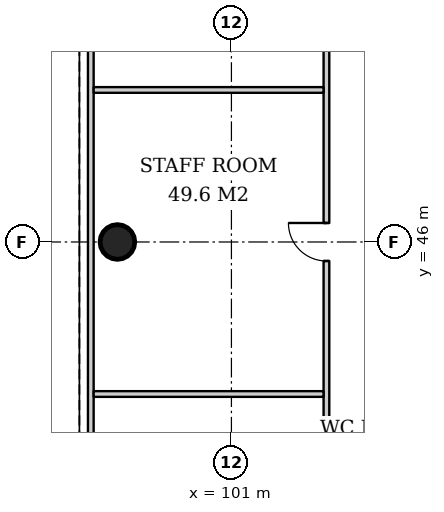
"""IFC4 building model, lengths in metres.
Left out: names, types, materials, properties, quantities, classifications, styles, units other than length and angle.
Written with IfcOpenShell. Run it as: python <this file> out.ifc"""

import sys

from ifc_helpers import new_model, si_unit, direction, frame, frame_2d, origin, origin_2d, place, context, subcontext, project, spatial, rectangle, hollow_circle, extrude, element, fill, save


model = new_model("IFC4")
c1 = context("Model", 3, precision=1e-05, world=origin(), true_north=direction((0.0, 1.0)))
c2 = subcontext(c1, "Body", "Model", "MODEL_VIEW")
j1 = project(units=[si_unit("LENGTHUNIT", "METRE"), si_unit("PLANEANGLEUNIT", "RADIAN")], contexts=[c1])
p1 = place(None, origin())
s1 = spatial("IfcSite", under=j1, at=p1, CompositionType="ELEMENT")
p2 = place(p1, origin())
s2 = spatial("IfcBuilding", under=s1, at=p2, CompositionType="ELEMENT")
p3 = place(p2, origin())
s3 = spatial("IfcBuildingStorey", under=s2, at=p3, CompositionType="ELEMENT", Elevation=0.0)
p4 = place(p3, frame((98.0, 46.0, 0.0), z_axis=(0.0, 0.0, 1.0), x_axis=(1.0, 0.0, 0.0)))
e1 = element("IfcColumn", 1, at=p4, inside=s3, PredefinedType="COLUMN", context=c2, shape_type="SweptSolid", body=[
    extrude(hollow_circle(Radius=0.457, WallThickness=0.03, at=origin_2d()), origin(), (0.0, 0.0, 1.0), 6.0),
])
p5 = place(p3, frame((97.3, 32.2, 0.0), z_axis=(0.0, 0.0, 1.0), x_axis=(0.0, 1.0, 0.0)))
e2 = element("IfcWall", 2, at=p5, inside=s3, PredefinedType="PARTITIONING", context=c2, shape_type="SweptSolid", body=[
    extrude(rectangle(XDim=27.6, YDim=0.15, at=frame_2d((13.8, 0.0))), origin(), (0.0, 0.0, 1.0), 5.7),
])
p6 = place(p3, frame((103.5, 32.2, 0.0), z_axis=(0.0, 0.0, 1.0), x_axis=(0.0, 1.0, 0.0)))
e3 = element("IfcWall", 3, at=p6, inside=s3, PredefinedType="PARTITIONING", context=c2, shape_type="SweptSolid", body=[
    extrude(rectangle(XDim=27.6, YDim=0.15, at=frame_2d((13.8, 0.0))), origin(), (0.0, 0.0, 1.0), 4.9),
])
p7 = place(p6, frame((4.4, 0.0, 0.0)))
e4 = element("IfcOpeningElement", 4, at=p7, cuts=e3, PredefinedType="OPENING", context=c2, shape_type="SweptSolid", body=[
    extrude(rectangle(XDim=1.0, YDim=2.1, at=frame_2d((0.5, 1.05))), frame((0.0, 0.085, 0.0), z_axis=(0.0, -1.0, 0.0), x_axis=(1.0, 0.0, 0.0)), (0.0, 0.0, 1.0), 0.17),
])
p8 = place(p6, frame((13.3, 0.0, 0.0)))
e5 = element("IfcOpeningElement", 5, at=p8, cuts=e3, PredefinedType="OPENING", context=c2, shape_type="SweptSolid", body=[
    extrude(rectangle(XDim=1.0, YDim=2.1, at=frame_2d((0.5, 1.05))), frame((0.0, 0.085, 0.0), z_axis=(0.0, -1.0, 0.0), x_axis=(1.0, 0.0, 0.0)), (0.0, 0.0, 1.0), 0.17),
])
p9 = place(p6, frame((22.2, 0.0, 0.0)))
e6 = element("IfcOpeningElement", 6, at=p9, cuts=e3, PredefinedType="OPENING", context=c2, shape_type="SweptSolid", body=[
    extrude(rectangle(XDim=1.0, YDim=2.1, at=frame_2d((0.5, 1.05))), frame((0.0, 0.085, 0.0), z_axis=(0.0, -1.0, 0.0), x_axis=(1.0, 0.0, 0.0)), (0.0, 0.0, 1.0), 0.17),
])
for number, where, z_axis, x_axis in (
    (7, (97.375, 42.0, 0.0), (0.0, 0.0, 1.0), (1.0, 0.0, 0.0)),
    (8, (97.375, 50.0, 0.0), (0.0, 0.0, 1.0), (1.0, 0.0, 0.0)),
):
    element("IfcWall", number, at=place(p3, frame(where, z_axis=z_axis, x_axis=x_axis)), inside=s3, PredefinedType="PARTITIONING", context=c2, shape_type="SweptSolid", body=[
        extrude(rectangle(XDim=6.05, YDim=0.15, at=frame_2d((3.025, 0.0))), origin(), (0.0, 0.0, 1.0), 5.15),
    ])
p10 = place(p8, origin())
e9 = element("IfcDoor", 9, at=p10, inside=s3, OperationType="SINGLE_SWING_RIGHT", PredefinedType="DOOR", context=c2, shape_type="SweptSolid", body=[
    extrude(rectangle(XDim=1.0, YDim=2.1, at=frame_2d((0.5, 1.05))), frame((0.0, 0.025, 0.0), z_axis=(0.0, -1.0, 0.0), x_axis=(1.0, 0.0, 0.0)), (0.0, 0.0, 1.0), 0.05),
])
fill(e5, e9)
save(model, sys.argv[1])
